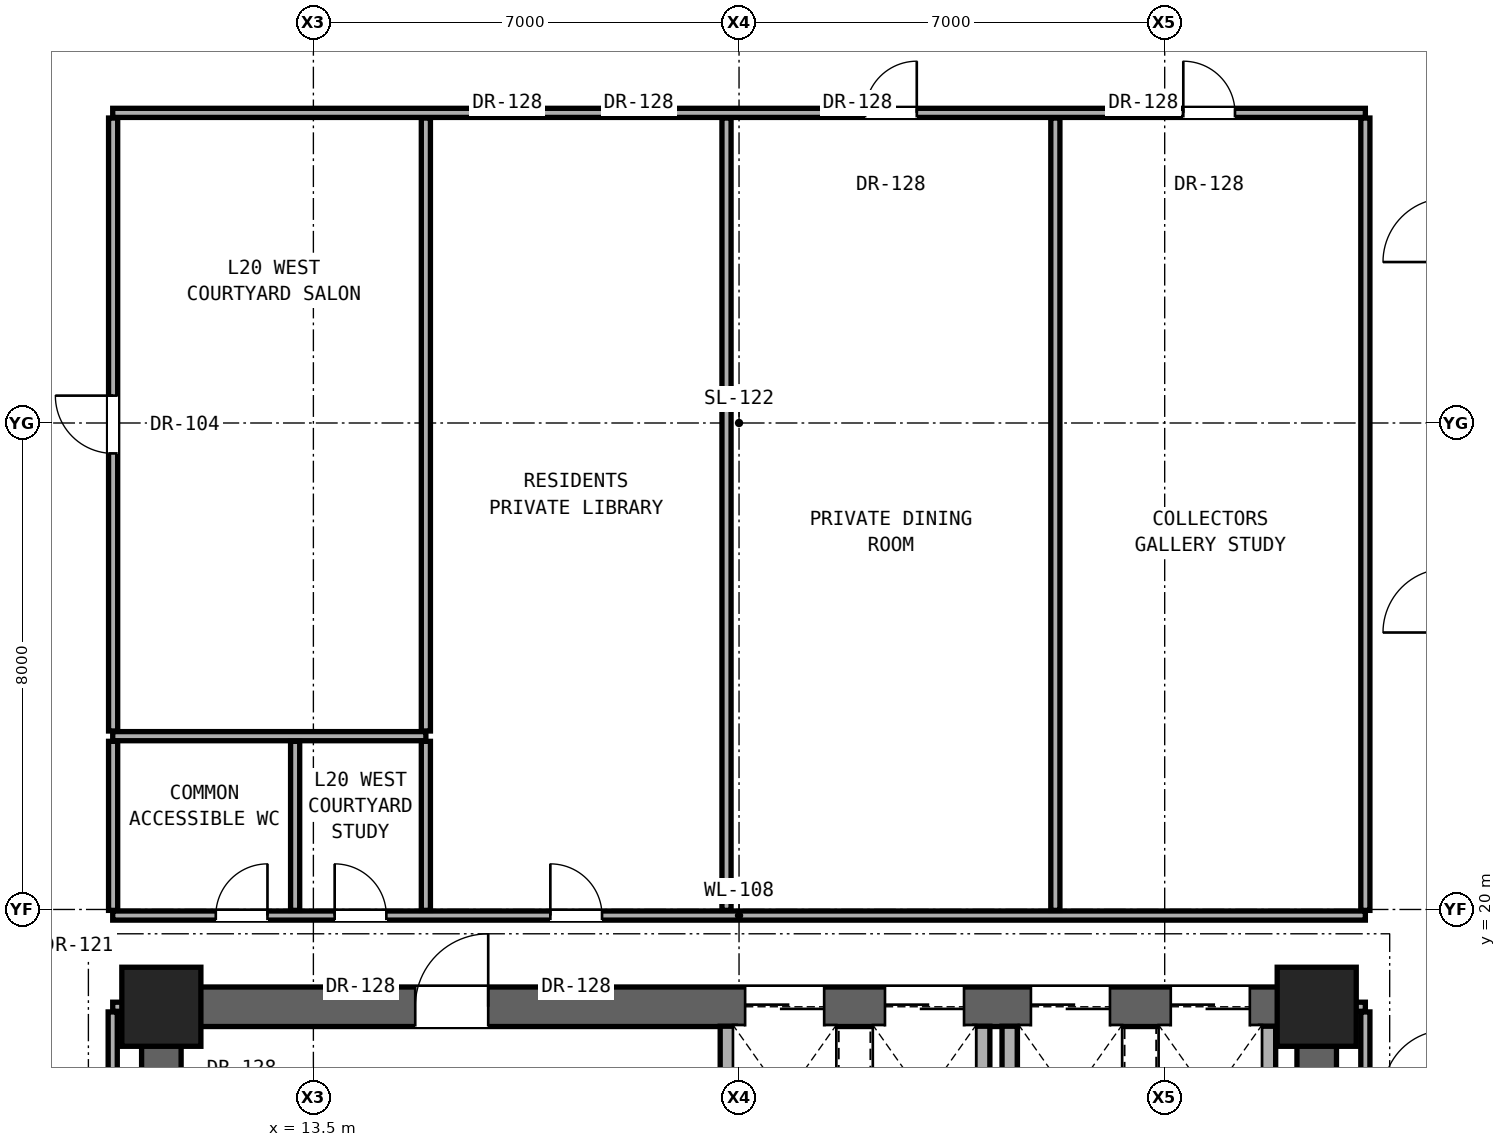
"""IFC4 building model, lengths in metres.
Left out: names, types, materials, properties, quantities, classifications, styles, units other than length and angle.
Written with IfcOpenShell. Run it as: python <this file> out.ifc"""

import sys

from ifc_helpers import new_model, si_unit, direction, frame, frame_2d, origin, origin_2d, place, context, subcontext, project, spatial, rectangle, extrude, element, fill, save


model = new_model("IFC4")
c1 = context("Model", 3, precision=1e-05, world=origin(), true_north=direction((0.0, 1.0)))
c2 = subcontext(c1, "Body", "Model", "MODEL_VIEW")
j1 = project(units=[si_unit("LENGTHUNIT", "METRE"), si_unit("PLANEANGLEUNIT", "RADIAN")], contexts=[c1])
p1 = place(None, origin())
s1 = spatial("IfcSite", under=j1, at=p1, CompositionType="ELEMENT")
p2 = place(p1, origin())
s2 = spatial("IfcBuilding", under=s1, at=p2, CompositionType="ELEMENT")
p3 = place(p2, frame((0.0, 0.0, 71.9)))
s3 = spatial("IfcBuildingStorey", under=s2, at=p3, CompositionType="ELEMENT", Elevation=71.9)
for number, where, z_axis, x_axis in (
    (1, (11.0, 18.4, 0.0), (0.0, 0.0, 1.0), (1.0, 0.0, 0.0)),
    (2, (30.0, 18.4, 0.0), (0.0, 0.0, 1.0), (1.0, 0.0, 0.0)),
):
    element("IfcColumn", number, at=place(p3, frame(where, z_axis=z_axis, x_axis=x_axis)), inside=s3, PredefinedType="COLUMN", context=c2, shape_type="SweptSolid", body=[
        extrude(rectangle(XDim=1.3, YDim=1.3, at=origin_2d()), origin(), (0.0, 0.0, 1.0), 3.3),
    ])
for number, where, z_axis, x_axis in (
    (3, (11.0, 12.4, 0.0), (0.0, 0.0, 1.0), (0.0, 1.0, 0.0)),
    (4, (30.0, 12.4, 0.0), (0.0, 0.0, 1.0), (0.0, 1.0, 0.0)),
):
    element("IfcWall", number, at=place(p3, frame(where, z_axis=z_axis, x_axis=x_axis)), inside=s3, PredefinedType="SHEAR", context=c2, shape_type="SweptSolid", body=[
        extrude(rectangle(XDim=6.0, YDim=0.65, at=frame_2d((3.0, 0.0))), origin(), (0.0, 0.0, 1.0), 3.06),
    ])
p4 = place(p3, frame((11.0, 18.4, 0.0), z_axis=(0.0, 0.0, 1.0), x_axis=(1.0, 0.0, 0.0)))
e5 = element("IfcWall", 5, at=p4, inside=s3, PredefinedType="SHEAR", context=c2, shape_type="SweptSolid", body=[
    extrude(rectangle(XDim=19.0, YDim=0.65, at=frame_2d((9.5, 0.0))), origin(), (0.0, 0.0, 1.0), 3.06),
])
p5 = place(p4, frame((4.175, 0.0, 0.0)))
e6 = element("IfcOpeningElement", 6, at=p5, cuts=e5, PredefinedType="OPENING", context=c2, shape_type="SweptSolid", body=[
    extrude(rectangle(XDim=1.2, YDim=2.25, at=frame_2d((0.6, 1.125))), frame((0.0, 0.335, 0.0), z_axis=(0.0, -1.0, 0.0), x_axis=(1.0, 0.0, 0.0)), (0.0, 0.0, 1.0), 0.67),
])
p6 = place(p4, frame((9.6, 0.0, 0.0)))
e7 = element("IfcOpeningElement", 7, at=p6, cuts=e5, PredefinedType="OPENING", context=c2, shape_type="SweptSolid", body=[
    extrude(rectangle(XDim=1.3, YDim=2.3, at=frame_2d((0.65, 1.15))), frame((0.0, 0.335, 0.0), z_axis=(0.0, -1.0, 0.0), x_axis=(1.0, 0.0, 0.0)), (0.0, 0.0, 1.0), 0.67),
])
p7 = place(p4, frame((11.9, 0.0, 0.0)))
e8 = element("IfcOpeningElement", 8, at=p7, cuts=e5, PredefinedType="OPENING", context=c2, shape_type="SweptSolid", body=[
    extrude(rectangle(XDim=1.3, YDim=2.3, at=frame_2d((0.65, 1.15))), frame((0.0, 0.335, 0.0), z_axis=(0.0, -1.0, 0.0), x_axis=(1.0, 0.0, 0.0)), (0.0, 0.0, 1.0), 0.67),
])
p8 = place(p4, frame((14.3, 0.0, 0.0)))
e9 = element("IfcOpeningElement", 9, at=p8, cuts=e5, PredefinedType="OPENING", context=c2, shape_type="SweptSolid", body=[
    extrude(rectangle(XDim=1.3, YDim=2.3, at=frame_2d((0.65, 1.15))), frame((0.0, 0.335, 0.0), z_axis=(0.0, -1.0, 0.0), x_axis=(1.0, 0.0, 0.0)), (0.0, 0.0, 1.0), 0.67),
])
p9 = place(p4, frame((16.6, 0.0, 0.0)))
e10 = element("IfcOpeningElement", 10, at=p9, cuts=e5, PredefinedType="OPENING", context=c2, shape_type="SweptSolid", body=[
    extrude(rectangle(XDim=1.3, YDim=2.3, at=frame_2d((0.65, 1.15))), frame((0.0, 0.335, 0.0), z_axis=(0.0, -1.0, 0.0), x_axis=(1.0, 0.0, 0.0)), (0.0, 0.0, 1.0), 0.67),
])
for number, where, z_axis, x_axis in (
    (11, (10.2, 18.4, 0.0), (0.0, 0.0, 1.0), (1.0, 0.0, 0.0)),
    (12, (30.32, 18.4, 0.0), (0.0, 0.0, 1.0), (1.0, 0.0, 0.0)),
):
    element("IfcWall", number, at=place(p3, frame(where, z_axis=z_axis, x_axis=x_axis)), inside=s3, PredefinedType="PARTITIONING", context=c2, shape_type="SweptSolid", body=[
        extrude(rectangle(XDim=0.48, YDim=0.15, at=frame_2d((0.24, 0.0))), origin(), (0.0, 0.0, 1.0), 2.436),
    ])
p10 = place(p3, frame((10.2, 19.9, 0.0), z_axis=(0.0, 0.0, 1.0), x_axis=(1.0, 0.0, 0.0)))
e13 = element("IfcWall", 13, at=p10, inside=s3, PredefinedType="PARTITIONING", context=c2, shape_type="SweptSolid", body=[
    extrude(rectangle(XDim=20.6, YDim=0.15, at=frame_2d((10.3, 0.0))), origin(), (0.0, 0.0, 1.0), 2.104),
])
p11 = place(p10, frame((1.695, 0.0, 0.0)))
e14 = element("IfcOpeningElement", 14, at=p11, cuts=e13, PredefinedType="OPENING", context=c2, shape_type="SweptSolid", body=[
    extrude(rectangle(XDim=0.85, YDim=2.01, at=frame_2d((0.425, 1.005))), frame((0.0, 0.085, 0.0), z_axis=(0.0, -1.0, 0.0), x_axis=(1.0, 0.0, 0.0)), (0.0, 0.0, 1.0), 0.17),
])
p12 = place(p10, frame((3.65, 0.0, 0.0)))
e15 = element("IfcOpeningElement", 15, at=p12, cuts=e13, PredefinedType="OPENING", context=c2, shape_type="SweptSolid", body=[
    extrude(rectangle(XDim=0.85, YDim=2.01, at=frame_2d((0.425, 1.005))), frame((0.0, 0.085, 0.0), z_axis=(0.0, -1.0, 0.0), x_axis=(1.0, 0.0, 0.0)), (0.0, 0.0, 1.0), 0.17),
])
p13 = place(p10, frame((7.197, 0.0, 0.0)))
e16 = element("IfcOpeningElement", 16, at=p13, cuts=e13, PredefinedType="OPENING", context=c2, shape_type="SweptSolid", body=[
    extrude(rectangle(XDim=0.85, YDim=2.01, at=frame_2d((0.425, 1.005))), frame((0.0, 0.085, 0.0), z_axis=(0.0, -1.0, 0.0), x_axis=(1.0, 0.0, 0.0)), (0.0, 0.0, 1.0), 0.17),
])
p14 = place(p3, frame((10.2, 22.85, 0.0), z_axis=(0.0, 0.0, 1.0), x_axis=(1.0, 0.0, 0.0)))
e17 = element("IfcWall", 17, at=p14, inside=s3, PredefinedType="PARTITIONING", context=c2, shape_type="SweptSolid", body=[
    extrude(rectangle(XDim=5.15, YDim=0.15, at=frame_2d((2.575, 0.0))), origin(), (0.0, 0.0, 1.0), 2.104),
])
p15 = place(p3, frame((10.2, 33.1, 0.0), z_axis=(0.0, 0.0, 1.0), x_axis=(1.0, 0.0, 0.0)))
e18 = element("IfcWall", 18, at=p15, inside=s3, PredefinedType="PARTITIONING", context=c2, shape_type="SweptSolid", body=[
    extrude(rectangle(XDim=20.6, YDim=0.15, at=frame_2d((10.3, 0.0))), origin(), (0.0, 0.0, 1.0), 2.104),
])
p16 = place(p15, frame((12.373, 0.0, 0.0)))
e19 = element("IfcOpeningElement", 19, at=p16, cuts=e18, PredefinedType="OPENING", context=c2, shape_type="SweptSolid", body=[
    extrude(rectangle(XDim=0.85, YDim=2.01, at=frame_2d((0.425, 1.005))), frame((0.0, 0.085, 0.0), z_axis=(0.0, -1.0, 0.0), x_axis=(1.0, 0.0, 0.0)), (0.0, 0.0, 1.0), 0.17),
])
p17 = place(p15, frame((17.606, 0.0, 0.0)))
e20 = element("IfcOpeningElement", 20, at=p17, cuts=e18, PredefinedType="OPENING", context=c2, shape_type="SweptSolid", body=[
    extrude(rectangle(XDim=0.85, YDim=2.01, at=frame_2d((0.425, 1.005))), frame((0.0, 0.085, 0.0), z_axis=(0.0, -1.0, 0.0), x_axis=(1.0, 0.0, 0.0)), (0.0, 0.0, 1.0), 0.17),
])
p18 = place(p3, frame((10.2, 12.335, 0.0), z_axis=(0.0, 0.0, 1.0), x_axis=(0.0, 1.0, 0.0)))
e21 = element("IfcWall", 21, at=p18, inside=s3, PredefinedType="PARTITIONING", context=c2, shape_type="SweptSolid", body=[
    extrude(rectangle(XDim=5.98, YDim=0.15, at=frame_2d((2.99, 0.0))), origin(), (0.0, 0.0, 1.0), 2.436),
])
p19 = place(p3, frame((10.207, 19.985, 0.0), z_axis=(0.0, 0.0, 1.0), x_axis=(0.0, 1.0, 0.0)))
e22 = element("IfcWall", 22, at=p19, inside=s3, PredefinedType="PARTITIONING", context=c2, shape_type="SweptSolid", body=[
    extrude(rectangle(XDim=2.78, YDim=0.15, at=frame_2d((1.39, 0.0))), origin(), (0.0, 0.0, 1.0), 3.06),
])
p20 = place(p3, frame((10.207, 22.935, 0.0), z_axis=(0.0, 0.0, 1.0), x_axis=(0.0, 1.0, 0.0)))
e23 = element("IfcWall", 23, at=p20, inside=s3, PredefinedType="PARTITIONING", context=c2, shape_type="SweptSolid", body=[
    extrude(rectangle(XDim=10.08, YDim=0.15, at=frame_2d((5.04, 0.0))), origin(), (0.0, 0.0, 1.0), 2.279),
])
p21 = place(p20, frame((4.565, 0.0, 0.0)))
e24 = element("IfcOpeningElement", 24, at=p21, cuts=e23, PredefinedType="OPENING", context=c2, shape_type="SweptSolid", body=[
    extrude(rectangle(XDim=0.95, YDim=2.15, at=frame_2d((0.475, 1.075))), frame((0.0, 0.085, 0.0), z_axis=(0.0, -1.0, 0.0), x_axis=(1.0, 0.0, 0.0)), (0.0, 0.0, 1.0), 0.17),
])
for number, where, z_axis, x_axis in (
    (25, (13.2, 19.985, 0.0), (0.0, 0.0, 1.0), (0.0, 1.0, 0.0)),
    (26, (15.35, 19.985, 0.0), (0.0, 0.0, 1.0), (0.0, 1.0, 0.0)),
):
    element("IfcWall", number, at=place(p3, frame(where, z_axis=z_axis, x_axis=x_axis)), inside=s3, PredefinedType="PARTITIONING", context=c2, shape_type="SweptSolid", body=[
        extrude(rectangle(XDim=2.78, YDim=0.15, at=frame_2d((1.39, 0.0))), origin(), (0.0, 0.0, 1.0), 3.06),
    ])
p22 = place(p3, frame((15.35, 22.935, 0.0), z_axis=(0.0, 0.0, 1.0), x_axis=(0.0, 1.0, 0.0)))
e27 = element("IfcWall", 27, at=p22, inside=s3, PredefinedType="PARTITIONING", context=c2, shape_type="SweptSolid", body=[
    extrude(rectangle(XDim=10.08, YDim=0.15, at=frame_2d((5.04, 0.0))), origin(), (0.0, 0.0, 1.0), 2.104),
])
p23 = place(p3, frame((20.315, 16.555, 0.0), z_axis=(0.0, 0.0, 1.0), x_axis=(0.0, 1.0, 0.0)))
e28 = element("IfcWall", 28, at=p23, inside=s3, PredefinedType="SOLIDWALL", context=c2, shape_type="SweptSolid", body=[
    extrude(rectangle(XDim=1.525, YDim=0.25, at=frame_2d((0.763, 0.0))), origin(), (0.0, 0.0, 1.0), 3.06),
])
p24 = place(p3, frame((20.294, 19.985, 0.0), z_axis=(0.0, 0.0, 1.0), x_axis=(0.0, 1.0, 0.0)))
e29 = element("IfcWall", 29, at=p24, inside=s3, PredefinedType="PARTITIONING", context=c2, shape_type="SweptSolid", body=[
    extrude(rectangle(XDim=13.03, YDim=0.15, at=frame_2d((6.515, 0.0))), origin(), (0.0, 0.0, 1.0), 2.104),
])
for number, where, z_axis, x_axis in (
    (30, (24.5, 15.785, 0.0), (0.0, 0.0, 1.0), (0.0, 1.0, 0.0)),
    (31, (24.95, 15.785, 0.0), (0.0, 0.0, 1.0), (0.0, 1.0, 0.0)),
):
    element("IfcWall", number, at=place(p3, frame(where, z_axis=z_axis, x_axis=x_axis)), inside=s3, PredefinedType="SOLIDWALL", context=c2, shape_type="SweptSolid", body=[
        extrude(rectangle(XDim=2.295, YDim=0.25, at=frame_2d((1.147, 0.0))), origin(), (0.0, 0.0, 1.0), 3.06),
    ])
p25 = place(p3, frame((25.702, 19.985, 0.0), z_axis=(0.0, 0.0, 1.0), x_axis=(0.0, 1.0, 0.0)))
e32 = element("IfcWall", 32, at=p25, inside=s3, PredefinedType="PARTITIONING", context=c2, shape_type="SweptSolid", body=[
    extrude(rectangle(XDim=13.03, YDim=0.15, at=frame_2d((6.515, 0.0))), origin(), (0.0, 0.0, 1.0), 2.104),
])
p26 = place(p3, frame((29.2, 15.785, 0.0), z_axis=(0.0, 0.0, 1.0), x_axis=(0.0, 1.0, 0.0)))
e33 = element("IfcWall", 33, at=p26, inside=s3, PredefinedType="SOLIDWALL", context=c2, shape_type="SweptSolid", body=[
    extrude(rectangle(XDim=2.295, YDim=0.25, at=frame_2d((1.147, 0.0))), origin(), (0.0, 0.0, 1.0), 3.06),
])
p27 = place(p3, frame((30.8, 12.335, 0.0), z_axis=(0.0, 0.0, 1.0), x_axis=(0.0, 1.0, 0.0)))
e34 = element("IfcWall", 34, at=p27, inside=s3, PredefinedType="PARTITIONING", context=c2, shape_type="SweptSolid", body=[
    extrude(rectangle(XDim=5.98, YDim=0.15, at=frame_2d((2.99, 0.0))), origin(), (0.0, 0.0, 1.0), 2.436),
])
p28 = place(p3, frame((30.8, 19.985, 0.0), z_axis=(0.0, 0.0, 1.0), x_axis=(0.0, 1.0, 0.0)))
e35 = element("IfcWall", 35, at=p28, inside=s3, PredefinedType="PARTITIONING", context=c2, shape_type="SweptSolid", body=[
    extrude(rectangle(XDim=13.03, YDim=0.15, at=frame_2d((6.515, 0.0))), origin(), (0.0, 0.0, 1.0), 2.279),
])
p29 = place(p5, origin())
e36 = element("IfcDoor", 36, at=p29, inside=s3, OperationType="SINGLE_SWING_RIGHT", PredefinedType="DOOR", context=c2, shape_type="SweptSolid", body=[
    extrude(rectangle(XDim=1.2, YDim=2.25, at=frame_2d((0.6, 1.125))), frame((0.0, 0.025, 0.0), z_axis=(0.0, -1.0, 0.0), x_axis=(1.0, 0.0, 0.0)), (0.0, 0.0, 1.0), 0.05),
])
fill(e6, e36)
p30 = place(p11, origin())
e37 = element("IfcDoor", 37, at=p30, inside=s3, OperationType="SINGLE_SWING_RIGHT", PredefinedType="DOOR", context=c2, shape_type="SweptSolid", body=[
    extrude(rectangle(XDim=0.85, YDim=2.01, at=frame_2d((0.425, 1.005))), frame((0.0, 0.025, 0.0), z_axis=(0.0, -1.0, 0.0), x_axis=(1.0, 0.0, 0.0)), (0.0, 0.0, 1.0), 0.05),
])
fill(e14, e37)
p31 = place(p12, origin())
e38 = element("IfcDoor", 38, at=p31, inside=s3, OperationType="SINGLE_SWING_LEFT", PredefinedType="DOOR", context=c2, shape_type="SweptSolid", body=[
    extrude(rectangle(XDim=0.85, YDim=2.01, at=frame_2d((0.425, 1.005))), frame((0.0, 0.025, 0.0), z_axis=(0.0, -1.0, 0.0), x_axis=(1.0, 0.0, 0.0)), (0.0, 0.0, 1.0), 0.05),
])
fill(e15, e38)
p32 = place(p21, origin())
e39 = element("IfcDoor", 39, at=p32, inside=s3, OperationType="SINGLE_SWING_RIGHT", PredefinedType="DOOR", context=c2, shape_type="SweptSolid", body=[
    extrude(rectangle(XDim=0.95, YDim=2.15, at=frame_2d((0.475, 1.075))), frame((0.0, 0.025, 0.0), z_axis=(0.0, -1.0, 0.0), x_axis=(1.0, 0.0, 0.0)), (0.0, 0.0, 1.0), 0.05),
])
fill(e24, e39)
p33 = place(p13, origin())
e40 = element("IfcDoor", 40, at=p33, inside=s3, OperationType="SINGLE_SWING_LEFT", PredefinedType="DOOR", context=c2, shape_type="SweptSolid", body=[
    extrude(rectangle(XDim=0.85, YDim=2.01, at=frame_2d((0.425, 1.005))), frame((0.0, 0.025, 0.0), z_axis=(0.0, -1.0, 0.0), x_axis=(1.0, 0.0, 0.0)), (0.0, 0.0, 1.0), 0.05),
])
fill(e16, e40)
p34 = place(p16, origin())
e41 = element("IfcDoor", 41, at=p34, inside=s3, OperationType="SINGLE_SWING_RIGHT", PredefinedType="DOOR", context=c2, shape_type="SweptSolid", body=[
    extrude(rectangle(XDim=0.85, YDim=2.01, at=frame_2d((0.425, 1.005))), frame((0.0, 0.025, 0.0), z_axis=(0.0, -1.0, 0.0), x_axis=(1.0, 0.0, 0.0)), (0.0, 0.0, 1.0), 0.05),
])
fill(e19, e41)
p35 = place(p17, origin())
e42 = element("IfcDoor", 42, at=p35, inside=s3, OperationType="SINGLE_SWING_LEFT", PredefinedType="DOOR", context=c2, shape_type="SweptSolid", body=[
    extrude(rectangle(XDim=0.85, YDim=2.01, at=frame_2d((0.425, 1.005))), frame((0.0, 0.025, 0.0), z_axis=(0.0, -1.0, 0.0), x_axis=(1.0, 0.0, 0.0)), (0.0, 0.0, 1.0), 0.05),
])
fill(e20, e42)
p36 = place(p6, origin())
e43 = element("IfcDoor", 43, at=p36, inside=s3, OperationType="DOUBLE_DOOR_SLIDING", PredefinedType="DOOR", context=c2, shape_type="SweptSolid", body=[
    extrude(rectangle(XDim=1.3, YDim=2.3, at=frame_2d((0.65, 1.15))), frame((0.0, 0.025, 0.0), z_axis=(0.0, -1.0, 0.0), x_axis=(1.0, 0.0, 0.0)), (0.0, 0.0, 1.0), 0.05),
])
fill(e7, e43)
p37 = place(p7, origin())
e44 = element("IfcDoor", 44, at=p37, inside=s3, OperationType="DOUBLE_DOOR_SLIDING", PredefinedType="DOOR", context=c2, shape_type="SweptSolid", body=[
    extrude(rectangle(XDim=1.3, YDim=2.3, at=frame_2d((0.65, 1.15))), frame((0.0, 0.025, 0.0), z_axis=(0.0, -1.0, 0.0), x_axis=(1.0, 0.0, 0.0)), (0.0, 0.0, 1.0), 0.05),
])
fill(e8, e44)
p38 = place(p8, origin())
e45 = element("IfcDoor", 45, at=p38, inside=s3, OperationType="DOUBLE_DOOR_SLIDING", PredefinedType="DOOR", context=c2, shape_type="SweptSolid", body=[
    extrude(rectangle(XDim=1.3, YDim=2.3, at=frame_2d((0.65, 1.15))), frame((0.0, 0.025, 0.0), z_axis=(0.0, -1.0, 0.0), x_axis=(1.0, 0.0, 0.0)), (0.0, 0.0, 1.0), 0.05),
])
fill(e9, e45)
p39 = place(p9, origin())
e46 = element("IfcDoor", 46, at=p39, inside=s3, OperationType="DOUBLE_DOOR_SLIDING", PredefinedType="DOOR", context=c2, shape_type="SweptSolid", body=[
    extrude(rectangle(XDim=1.3, YDim=2.3, at=frame_2d((0.65, 1.15))), frame((0.0, 0.025, 0.0), z_axis=(0.0, -1.0, 0.0), x_axis=(1.0, 0.0, 0.0)), (0.0, 0.0, 1.0), 0.05),
])
fill(e10, e46)
save(model, sys.argv[1])
